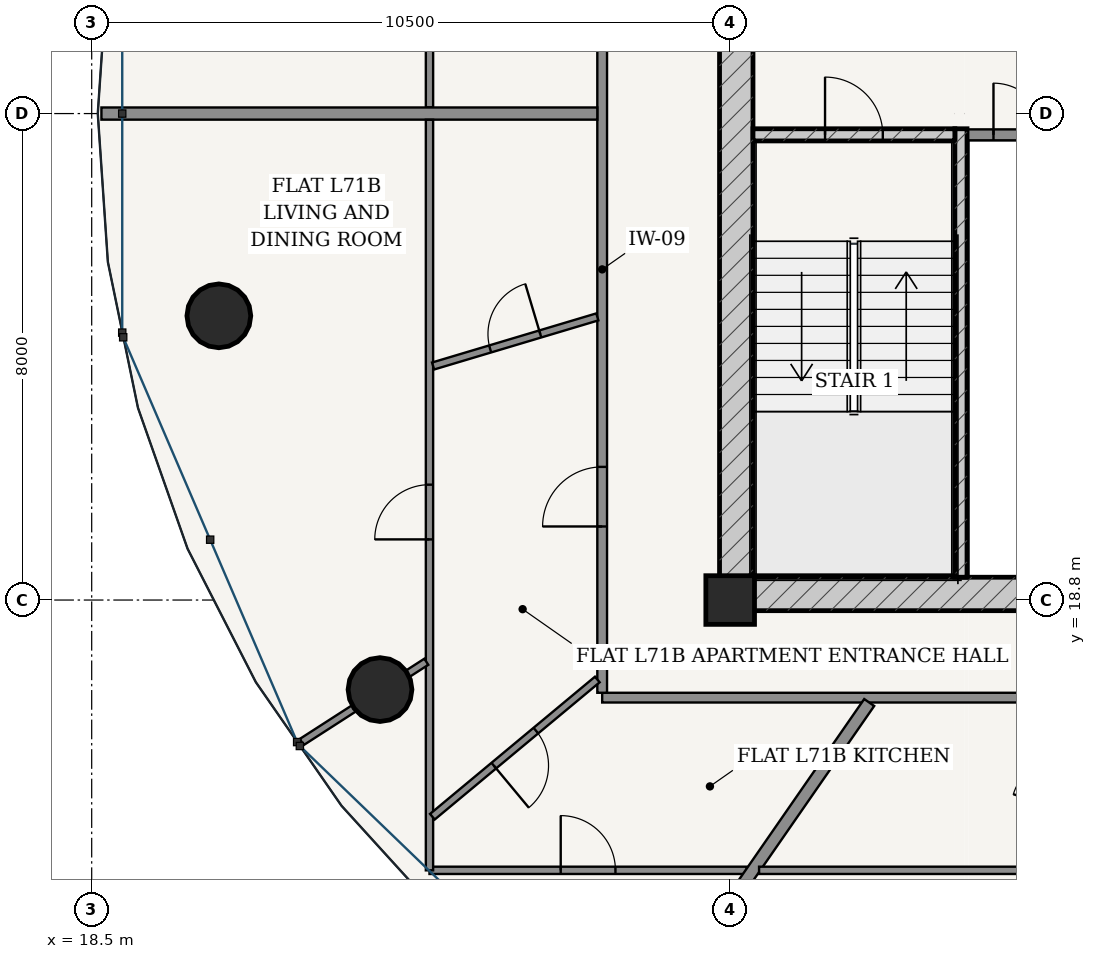
"""IFC4 building model, lengths in metres.
Left out: names, types, materials, properties, quantities, classifications, styles, units other than length and angle.
Written with IfcOpenShell. Run it as: python <this file> out.ifc"""

import sys

from ifc_helpers import new_model, si_unit, direction, frame, frame_2d, origin, origin_2d, place, context, subcontext, project, spatial, rectangle, hollow_circle, extrude, source, transform, mapped, element, fill, save


model = new_model("IFC4")
c1 = context("Model", 3, precision=1e-05, world=origin(), true_north=direction((-0.2419218956, 0.970295726276)))
c2 = subcontext(c1, "Body", "Model", "MODEL_VIEW")
j1 = project(units=[si_unit("LENGTHUNIT", "METRE"), si_unit("PLANEANGLEUNIT", "RADIAN")], contexts=[c1])
p1 = place(None, origin())
s1 = spatial("IfcSite", under=j1, at=p1, CompositionType="ELEMENT")
p2 = place(p1, origin())
s2 = spatial("IfcBuilding", under=s1, at=p2, CompositionType="ELEMENT")
p3 = place(p2, frame((0.0, 0.0, 270.7)))
s3 = spatial("IfcBuildingStorey", under=s2, at=p3, CompositionType="ELEMENT", Elevation=270.7)
p4 = place(p3, frame((29.0, 18.8, 0.0), z_axis=(0.0, 0.0, 1.0), x_axis=(1.0, 0.0, 0.0)))
e1 = element("IfcColumn", 1, at=p4, inside=s3, PredefinedType="COLUMN", context=c2, shape_type="SweptSolid", body=[
    extrude(rectangle(XDim=0.8, YDim=0.8, at=origin_2d()), origin(), (0.0, 0.0, 1.0), 3.75),
])
p5 = place(p3, frame((28.825, 18.9, 0.0), z_axis=(0.0, 0.0, 1.0), x_axis=(1.0, 0.0, 0.0)))
e2 = element("IfcWall", 2, at=p5, inside=s3, PredefinedType="SHEAR", context=c2, shape_type="SweptSolid", body=[
    extrude(rectangle(XDim=18.35, YDim=0.55, at=frame_2d((9.175, 0.0))), origin(), (0.0, 0.0, 1.0), 3.49),
])
p6 = place(p5, frame((6.71, 0.0, 0.0)))
e3 = element("IfcOpeningElement", 3, at=p6, cuts=e2, PredefinedType="OPENING", context=c2, shape_type="SweptSolid", body=[
    extrude(rectangle(XDim=0.85, YDim=2.1, at=frame_2d((0.425, 1.05))), frame((0.0, 0.285, 0.0), z_axis=(0.0, -1.0, 0.0), x_axis=(1.0, 0.0, 0.0)), (0.0, 0.0, 1.0), 0.57),
])
p7 = place(p5, frame((8.75, 0.0, 0.0)))
e4 = element("IfcOpeningElement", 4, at=p7, cuts=e2, PredefinedType="OPENING", context=c2, shape_type="SweptSolid", body=[
    extrude(rectangle(XDim=0.85, YDim=2.1, at=frame_2d((0.425, 1.05))), frame((0.0, 0.285, 0.0), z_axis=(0.0, -1.0, 0.0), x_axis=(1.0, 0.0, 0.0)), (0.0, 0.0, 1.0), 0.57),
])
p8 = place(p5, frame((10.79, 0.0, 0.0)))
e5 = element("IfcOpeningElement", 5, at=p8, cuts=e2, PredefinedType="OPENING", context=c2, shape_type="SweptSolid", body=[
    extrude(rectangle(XDim=0.85, YDim=2.1, at=frame_2d((0.425, 1.05))), frame((0.0, 0.285, 0.0), z_axis=(0.0, -1.0, 0.0), x_axis=(1.0, 0.0, 0.0)), (0.0, 0.0, 1.0), 0.57),
])
p9 = place(p3, frame((29.1, 19.175, 0.0), z_axis=(0.0, 0.0, 1.0), x_axis=(0.0, 1.0, 0.0)))
e6 = element("IfcWall", 6, at=p9, inside=s3, PredefinedType="SHEAR", context=c2, shape_type="SweptSolid", body=[
    extrude(rectangle(XDim=15.25, YDim=0.55, at=frame_2d((7.625, 0.0))), origin(), (0.0, 0.0, 1.0), 3.49),
])
p10 = place(p9, frame((9.875, 0.0, 0.0)))
e7 = element("IfcOpeningElement", 7, at=p10, cuts=e6, PredefinedType="OPENING", context=c2, shape_type="SweptSolid", body=[
    extrude(rectangle(XDim=1.5, YDim=2.2, at=frame_2d((0.75, 1.1))), frame((0.0, 0.285, 0.0), z_axis=(0.0, -1.0, 0.0), x_axis=(1.0, 0.0, 0.0)), (0.0, 0.0, 1.0), 0.57),
])
p11 = place(p3, frame((32.795, 19.175, 0.0), z_axis=(0.0, 0.0, 1.0), x_axis=(0.0, 1.0, 0.0)))
e8 = element("IfcWall", 8, at=p11, inside=s3, PredefinedType="SOLIDWALL", context=c2, shape_type="SweptSolid", body=[
    extrude(rectangle(XDim=7.375, YDim=0.2, at=frame_2d((3.688, 0.0))), origin(), (0.0, 0.0, 1.0), 3.49),
])
p12 = place(p3, frame((29.375, 26.45, 0.0), z_axis=(0.0, 0.0, 1.0), x_axis=(1.0, 0.0, 0.0)))
e9 = element("IfcWall", 9, at=p12, inside=s3, PredefinedType="SOLIDWALL", context=c2, shape_type="SweptSolid", body=[
    extrude(rectangle(XDim=3.32, YDim=0.2, at=frame_2d((1.66, 0.0))), origin(), (0.0, 0.0, 1.0), 3.49),
])
p13 = place(p12, frame((1.185, 0.0, 0.0)))
e10 = element("IfcOpeningElement", 10, at=p13, cuts=e9, PredefinedType="OPENING", context=c2, shape_type="SweptSolid", body=[
    extrude(rectangle(XDim=0.95, YDim=2.15, at=frame_2d((0.475, 1.075))), frame((0.0, 0.11, 0.0), z_axis=(0.0, -1.0, 0.0), x_axis=(1.0, 0.0, 0.0)), (0.0, 0.0, 1.0), 0.22),
])
for number, where, z_axis, x_axis in (
    (11, (20.591, 23.474, 0.0), (0.0, 0.0, 1.0), (1.0, 0.0, 0.0)),
    (12, (23.241, 17.328, 0.0), (0.0, 0.0, 1.0), (1.0, 0.0, 0.0)),
):
    element("IfcColumn", number, at=place(p3, frame(where, z_axis=z_axis, x_axis=x_axis)), inside=s3, PredefinedType="COLUMN", context=c2, shape_type="SweptSolid", body=[
        extrude(hollow_circle(Radius=0.525, WallThickness=0.035, at=origin_2d()), origin(), (0.0, 0.0, 1.0), 3.75),
    ])
p14 = place(p3, frame((32.9, 26.45, 0.0), z_axis=(0.0, 0.0, 1.0), x_axis=(1.0, 0.0, 0.0)))
e13 = element("IfcWall", 13, at=p14, inside=s3, PredefinedType="PARTITIONING", context=c2, shape_type="SweptSolid", body=[
    extrude(rectangle(XDim=1.71, YDim=0.18, at=frame_2d((0.855, 0.0))), origin(), (0.0, 0.0, 1.0), 3.49),
])
p15 = place(p14, frame((0.43, 0.0, 0.0)))
e14 = element("IfcOpeningElement", 14, at=p15, cuts=e13, PredefinedType="OPENING", context=c2, shape_type="SweptSolid", body=[
    extrude(rectangle(XDim=0.85, YDim=2.1, at=frame_2d((0.425, 1.05))), frame((0.0, 0.1, 0.0), z_axis=(0.0, -1.0, 0.0), x_axis=(1.0, 0.0, 0.0)), (0.0, 0.0, 1.0), 0.2),
])
p16 = place(p3, frame((26.895, 17.195, 0.0), z_axis=(0.0, 0.0, 1.0), x_axis=(1.0, 0.0, 0.0)))
e15 = element("IfcWall", 15, at=p16, inside=s3, PredefinedType="PARTITIONING", context=c2, shape_type="SweptSolid", body=[
    extrude(rectangle(XDim=22.21, YDim=0.16, at=frame_2d((11.105, 0.0))), origin(), (0.0, 0.0, 1.0), 3.015),
])
p17 = place(p16, frame((9.746, 0.0, 0.0)))
e16 = element("IfcOpeningElement", 16, at=p17, cuts=e15, PredefinedType="OPENING", context=c2, shape_type="SweptSolid", body=[
    extrude(rectangle(XDim=0.98, YDim=2.2, at=frame_2d((0.49, 1.1))), frame((0.0, 0.09, 0.0), z_axis=(0.0, -1.0, 0.0), x_axis=(1.0, 0.0, 0.0)), (0.0, 0.0, 1.0), 0.18),
])
p18 = place(p16, frame((20.864, 0.0, 0.0)))
e17 = element("IfcOpeningElement", 17, at=p18, cuts=e15, PredefinedType="OPENING", context=c2, shape_type="SweptSolid", body=[
    extrude(rectangle(XDim=0.98, YDim=2.2, at=frame_2d((0.49, 1.1))), frame((0.0, 0.09, 0.0), z_axis=(0.0, -1.0, 0.0), x_axis=(1.0, 0.0, 0.0)), (0.0, 0.0, 1.0), 0.18),
])
p19 = place(p3, frame((26.895, 17.275, 0.0), z_axis=(0.0, 0.0, 1.0), x_axis=(0.0, 1.0, 0.0)))
e18 = element("IfcWall", 18, at=p19, inside=s3, PredefinedType="PARTITIONING", context=c2, shape_type="SweptSolid", body=[
    extrude(rectangle(XDim=13.925, YDim=0.16, at=frame_2d((6.962, 0.0))), origin(), (0.0, 0.0, 1.0), 3.015),
])
p20 = place(p19, frame((2.735, 0.0, 0.0)))
e19 = element("IfcOpeningElement", 19, at=p20, cuts=e18, PredefinedType="OPENING", context=c2, shape_type="SweptSolid", body=[
    extrude(rectangle(XDim=0.98, YDim=2.2, at=frame_2d((0.49, 1.1))), frame((0.0, 0.09, 0.0), z_axis=(0.0, -1.0, 0.0), x_axis=(1.0, 0.0, 0.0)), (0.0, 0.0, 1.0), 0.18),
])
p21 = place(p3, frame((24.055, 26.902, 0.0), z_axis=(0.0, 0.0, 1.0), x_axis=(0.0, 1.0, 0.0)))
e20 = element("IfcWall", 20, at=p21, inside=s3, PredefinedType="PARTITIONING", context=c2, shape_type="SweptSolid", body=[
    extrude(rectangle(XDim=7.218, YDim=0.12, at=frame_2d((3.609, 0.0))), origin(), (0.0, 0.0, 1.0), 3.015),
])
p22 = place(p3, frame((26.815, 26.8, 0.0), z_axis=(0.0, 0.0, 1.0), x_axis=(-1.0, 0.0, 0.0)))
e21 = element("IfcWall", 21, at=p22, inside=s3, PredefinedType="PARTITIONING", context=c2, shape_type="SweptSolid", body=[
    extrude(rectangle(XDim=8.155, YDim=0.2, at=frame_2d((4.078, 0.0))), origin(), (0.0, 0.0, 1.0), 3.121),
])
p23 = place(p3, frame((29.271, 14.355, 0.0), z_axis=(0.0, 0.0, 1.0), x_axis=(-1.0, 0.0, 0.0)))
e22 = element("IfcWall", 22, at=p23, inside=s3, PredefinedType="PARTITIONING", context=c2, shape_type="SweptSolid", body=[
    extrude(rectangle(XDim=5.216, YDim=0.12, at=frame_2d((2.608, 0.0))), origin(), (0.0, 0.0, 1.0), 3.015),
])
p24 = place(p23, frame((2.158, 0.0, 0.0)))
e23 = element("IfcOpeningElement", 23, at=p24, cuts=e22, PredefinedType="OPENING", context=c2, shape_type="SweptSolid", body=[
    extrude(rectangle(XDim=0.9, YDim=2.15, at=frame_2d((0.45, 1.075))), frame((0.0, 0.07, 0.0), z_axis=(0.0, -1.0, 0.0), x_axis=(1.0, 0.0, 0.0)), (0.0, 0.0, 1.0), 0.14),
])
p25 = place(p3, frame((24.055, 14.355, 0.0), z_axis=(0.0, 0.0, 1.0), x_axis=(0.0, 1.0, 0.0)))
e24 = element("IfcWall", 24, at=p25, inside=s3, PredefinedType="PARTITIONING", context=c2, shape_type="SweptSolid", body=[
    extrude(rectangle(XDim=12.343, YDim=0.12, at=frame_2d((6.171, 0.0))), origin(), (0.0, 0.0, 1.0), 3.015),
])
p26 = place(p25, frame((5.442, 0.0, 0.0)))
e25 = element("IfcOpeningElement", 25, at=p26, cuts=e24, PredefinedType="OPENING", context=c2, shape_type="SweptSolid", body=[
    extrude(rectangle(XDim=0.9, YDim=2.15, at=frame_2d((0.45, 1.075))), frame((0.0, 0.07, 0.0), z_axis=(0.0, -1.0, 0.0), x_axis=(1.0, 0.0, 0.0)), (0.0, 0.0, 1.0), 0.14),
])
p27 = place(p3, frame((24.003, 17.785, 0.0), z_axis=(0.0, 0.0, 1.0), x_axis=(-0.840715962824, -0.541476379774, 0.0)))
e26 = element("IfcWall", 26, at=p27, inside=s3, PredefinedType="PARTITIONING", context=c2, shape_type="SweptSolid", body=[
    extrude(rectangle(XDim=2.437, YDim=0.12, at=frame_2d((1.219, 0.0))), origin(), (0.0, 0.0, 1.0), 3.015),
])
p28 = place(p3, frame((26.815, 23.456, 0.0), z_axis=(0.0, 0.0, 1.0), x_axis=(-0.958095258025, -0.286449780154, 0.0)))
e27 = element("IfcWall", 27, at=p28, inside=s3, PredefinedType="PARTITIONING", context=c2, shape_type="SweptSolid", body=[
    extrude(rectangle(XDim=2.819, YDim=0.12, at=frame_2d((1.409, 0.0))), origin(), (0.0, 0.0, 1.0), 3.209),
])
p29 = place(p28, frame((0.979, 0.0, 0.0)))
e28 = element("IfcOpeningElement", 28, at=p29, cuts=e27, PredefinedType="OPENING", context=c2, shape_type="SweptSolid", body=[
    extrude(rectangle(XDim=0.86, YDim=2.15, at=frame_2d((0.43, 1.075))), frame((0.0, 0.07, 0.0), z_axis=(0.0, -1.0, 0.0), x_axis=(1.0, 0.0, 0.0)), (0.0, 0.0, 1.0), 0.14),
])
p30 = place(p3, frame((26.815, 17.493, 0.0), z_axis=(0.0, 0.0, 1.0), x_axis=(-0.768708794437, -0.639598928513, 0.0)))
e29 = element("IfcWall", 29, at=p30, inside=s3, PredefinedType="PARTITIONING", context=c2, shape_type="SweptSolid", body=[
    extrude(rectangle(XDim=3.529, YDim=0.12, at=frame_2d((1.764, 0.0))), origin(), (0.0, 0.0, 1.0), 3.121),
])
p31 = place(p30, frame((1.314, 0.0, 0.0)))
e30 = element("IfcOpeningElement", 30, at=p31, cuts=e29, PredefinedType="OPENING", context=c2, shape_type="SweptSolid", body=[
    extrude(rectangle(XDim=0.9, YDim=2.15, at=frame_2d((0.45, 1.075))), frame((0.0, 0.07, 0.0), z_axis=(0.0, -1.0, 0.0), x_axis=(1.0, 0.0, 0.0)), (0.0, 0.0, 1.0), 0.14),
])
p32 = place(p3, frame((31.286, 17.115, 0.0), z_axis=(0.0, 0.0, 1.0), x_axis=(-0.569682734556, -0.821864698079, 0.0)))
e31 = element("IfcWall", 31, at=p32, inside=s3, PredefinedType="PARTITIONING", context=c2, shape_type="SweptSolid", body=[
    extrude(rectangle(XDim=7.034, YDim=0.2, at=frame_2d((3.517, 0.0))), origin(), (0.0, 0.0, 1.0), 3.015),
])
p33 = place(p3, frame((43.246, 14.355, 0.0), z_axis=(0.0, 0.0, 1.0), x_axis=(-1.0, 0.0, 0.0)))
e32 = element("IfcWall", 32, at=p33, inside=s3, PredefinedType="PARTITIONING", context=c2, shape_type="SweptSolid", body=[
    extrude(rectangle(XDim=13.771, YDim=0.12, at=frame_2d((6.885, 0.0))), origin(), (0.0, 0.0, 1.0), 3.015),
])
p34 = place(p33, frame((5.244, 0.0, 0.0)))
e33 = element("IfcOpeningElement", 33, at=p34, cuts=e32, PredefinedType="OPENING", context=c2, shape_type="SweptSolid", body=[
    extrude(rectangle(XDim=0.9, YDim=2.15, at=frame_2d((0.45, 1.075))), frame((0.0, 0.07, 0.0), z_axis=(0.0, -1.0, 0.0), x_axis=(1.0, 0.0, 0.0)), (0.0, 0.0, 1.0), 0.14),
])
m1 = source(origin(), c2, "Body", "SweptSolid", [
    extrude(rectangle(XDim=0.95, YDim=2.15, at=frame_2d((0.475, 1.075))), frame((0.0, 0.025, 0.0), z_axis=(0.0, -1.0, 0.0), x_axis=(1.0, 0.0, 0.0)), (0.0, 0.0, 1.0), 0.05),
])
p35 = place(p13, origin())
e34 = element("IfcDoor", 34, at=p35, inside=s3, OperationType="SINGLE_SWING_LEFT", PredefinedType="DOOR", context=c2, shape_type="MappedRepresentation", body=[
    mapped(m1, transform((0.0, 0.0, 0.0), scale=1.0)),
])
fill(e10, e34)
m2 = source(origin(), c2, "Body", "SweptSolid", [
    extrude(rectangle(XDim=0.85, YDim=2.1, at=frame_2d((0.425, 1.05))), frame((0.0, 0.025, 0.0), z_axis=(0.0, -1.0, 0.0), x_axis=(1.0, 0.0, 0.0)), (0.0, 0.0, 1.0), 0.05),
])
p36 = place(p15, origin())
e35 = element("IfcDoor", 35, at=p36, inside=s3, OperationType="SINGLE_SWING_LEFT", PredefinedType="DOOR", context=c2, shape_type="MappedRepresentation", body=[
    mapped(m2, transform((0.0, 0.0, 0.0), scale=1.0)),
])
fill(e14, e35)
m3 = source(origin(), c2, "Body", "SweptSolid", [
    extrude(rectangle(XDim=0.98, YDim=2.2, at=frame_2d((0.49, 1.1))), frame((0.0, 0.025, 0.0), z_axis=(0.0, -1.0, 0.0), x_axis=(1.0, 0.0, 0.0)), (0.0, 0.0, 1.0), 0.05),
])
p37 = place(p20, origin())
e36 = element("IfcDoor", 36, at=p37, inside=s3, OperationType="SINGLE_SWING_LEFT", PredefinedType="DOOR", context=c2, shape_type="MappedRepresentation", body=[
    mapped(m3, transform((0.0, 0.0, 0.0), scale=1.0)),
])
fill(e19, e36)
m4 = source(origin(), c2, "Body", "SweptSolid", [
    extrude(rectangle(XDim=0.86, YDim=2.15, at=frame_2d((0.43, 1.075))), frame((0.0, 0.025, 0.0), z_axis=(0.0, -1.0, 0.0), x_axis=(1.0, 0.0, 0.0)), (0.0, 0.0, 1.0), 0.05),
])
p38 = place(p29, frame((0.86, 0.0, 0.0), z_axis=(0.0, 0.0, 1.0), x_axis=(-1.0, 0.0, 0.0)))
e37 = element("IfcDoor", 37, at=p38, inside=s3, OperationType="SINGLE_SWING_RIGHT", PredefinedType="DOOR", context=c2, shape_type="MappedRepresentation", body=[
    mapped(m4, transform((0.0, 0.0, 0.0), scale=1.0)),
])
fill(e28, e37)
m5 = source(origin(), c2, "Body", "SweptSolid", [
    extrude(rectangle(XDim=0.9, YDim=2.15, at=frame_2d((0.45, 1.075))), frame((0.0, 0.025, 0.0), z_axis=(0.0, -1.0, 0.0), x_axis=(1.0, 0.0, 0.0)), (0.0, 0.0, 1.0), 0.05),
])
p39 = place(p26, origin())
e38 = element("IfcDoor", 38, at=p39, inside=s3, OperationType="SINGLE_SWING_LEFT", PredefinedType="DOOR", context=c2, shape_type="MappedRepresentation", body=[
    mapped(m5, transform((0.0, 0.0, 0.0), scale=1.0)),
])
fill(e25, e38)
p40 = place(p31, origin())
e39 = element("IfcDoor", 39, at=p40, inside=s3, OperationType="SINGLE_SWING_RIGHT", PredefinedType="DOOR", context=c2, shape_type="MappedRepresentation", body=[
    mapped(m5, transform((0.0, 0.0, 0.0), scale=1.0)),
])
fill(e30, e39)
p41 = place(p24, frame((0.9, 0.0, 0.0), z_axis=(0.0, 0.0, 1.0), x_axis=(-1.0, 0.0, 0.0)))
e40 = element("IfcDoor", 40, at=p41, inside=s3, OperationType="SINGLE_SWING_LEFT", PredefinedType="DOOR", context=c2, shape_type="MappedRepresentation", body=[
    mapped(m5, transform((0.0, 0.0, 0.0), scale=1.0)),
])
fill(e23, e40)
save(model, sys.argv[1])
